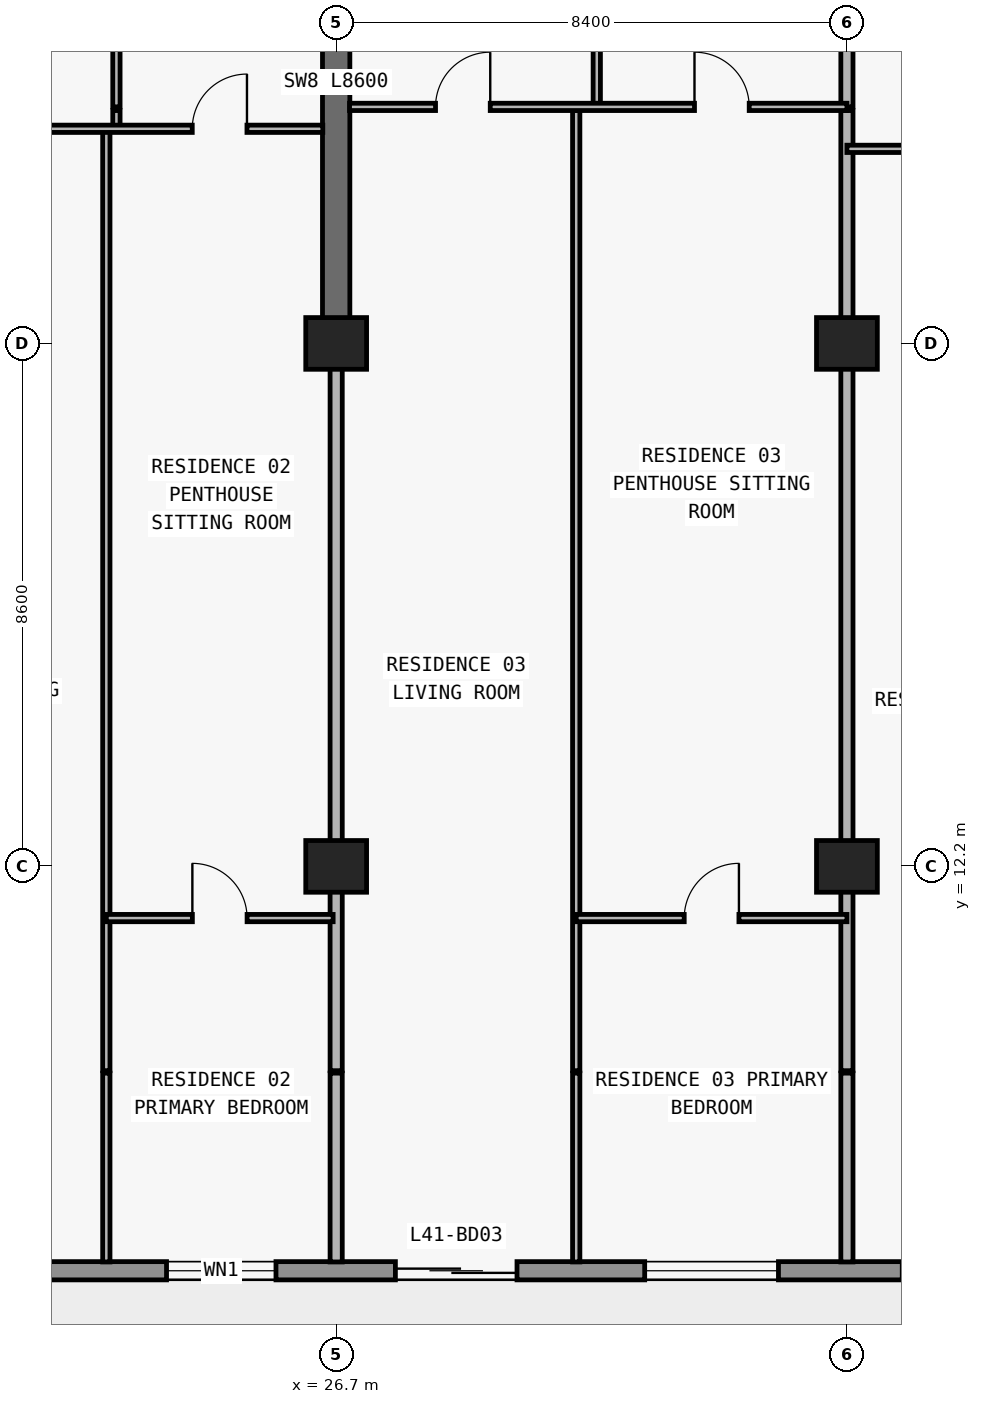
"""IFC4 building model, lengths in metres.
Left out: names, types, materials, properties, quantities, classifications, styles, units other than length and angle.
Written with IfcOpenShell. Run it as: python <this file> out.ifc"""

import sys

from ifc_helpers import new_model, si_unit, direction, frame, frame_2d, origin, origin_2d, place, context, subcontext, project, spatial, rectangle, extrude, element, fill, save


model = new_model("IFC4")
c1 = context("Model", 3, precision=1e-05, world=origin(), true_north=direction((0.0, 1.0)))
c2 = subcontext(c1, "Body", "Model", "MODEL_VIEW")
j1 = project(units=[si_unit("LENGTHUNIT", "METRE"), si_unit("PLANEANGLEUNIT", "RADIAN")], contexts=[c1])
p1 = place(None, origin())
s1 = spatial("IfcSite", under=j1, at=p1, CompositionType="ELEMENT")
p2 = place(p1, origin())
s2 = spatial("IfcBuilding", under=s1, at=p2, CompositionType="ELEMENT")
p3 = place(p2, frame((0.0, 0.0, 148.8)))
s3 = spatial("IfcBuildingStorey", under=s2, at=p3, CompositionType="ELEMENT", Elevation=148.8)
for number, where, z_axis, x_axis in (
    (1, (26.7, 12.2, 0.0), (0.0, 0.0, 1.0), (1.0, 0.0, 0.0)),
    (2, (35.1, 12.2, 0.0), (0.0, 0.0, 1.0), (1.0, 0.0, 0.0)),
    (3, (26.7, 20.8, 0.0), (0.0, 0.0, 1.0), (1.0, 0.0, 0.0)),
    (4, (35.1, 20.8, 0.0), (0.0, 0.0, 1.0), (1.0, 0.0, 0.0)),
):
    element("IfcColumn", number, at=place(p3, frame(where, z_axis=z_axis, x_axis=x_axis)), inside=s3, PredefinedType="COLUMN", context=c2, shape_type="SweptSolid", body=[
        extrude(rectangle(XDim=1.0, YDim=0.85, at=origin_2d()), origin(), (0.0, 0.0, 1.0), 3.0),
    ])
p4 = place(p3, frame((26.7, 20.8, 0.0), z_axis=(0.0, 0.0, 1.0), x_axis=(0.0, 1.0, 0.0)))
e5 = element("IfcWall", 5, at=p4, inside=s3, PredefinedType="SHEAR", context=c2, shape_type="SweptSolid", body=[
    extrude(rectangle(XDim=8.6, YDim=0.45, at=frame_2d((4.3, 0.0))), origin(), (0.0, 0.0, 1.0), 3.0),
])
p5 = place(p3, frame((70.1, 5.55, 0.0), z_axis=(0.0, 0.0, 1.0), x_axis=(-1.0, 0.0, 0.0)))
e6 = element("IfcWall", 6, at=p5, inside=s3, PredefinedType="STANDARD", context=c2, shape_type="SweptSolid", body=[
    extrude(rectangle(XDim=62.4, YDim=0.3, at=frame_2d((31.2, 0.0))), origin(), (0.0, 0.0, 1.0), 3.0),
])
p6 = place(p5, frame((57.226, 0.0, 0.0)))
e7 = element("IfcOpeningElement", 7, at=p6, cuts=e6, PredefinedType="OPENING", context=c2, shape_type="SweptSolid", body=[
    extrude(rectangle(XDim=2.0, YDim=2.3, at=frame_2d((1.0, 1.15))), frame((0.0, 0.16, 0.0), z_axis=(0.0, -1.0, 0.0), x_axis=(1.0, 0.0, 0.0)), (0.0, 0.0, 1.0), 0.32),
])
p7 = place(p5, frame((52.926, 0.0, 0.85)))
e8 = element("IfcOpeningElement", 8, at=p7, cuts=e6, PredefinedType="OPENING", context=c2, shape_type="SweptSolid", body=[
    extrude(rectangle(XDim=2.2, YDim=1.55, at=frame_2d((1.1, 0.775))), frame((0.0, 0.16, 0.0), z_axis=(0.0, -1.0, 0.0), x_axis=(1.0, 0.0, 0.0)), (0.0, 0.0, 1.0), 0.32),
])
p8 = place(p5, frame((48.49, 0.0, 0.0)))
e9 = element("IfcOpeningElement", 9, at=p8, cuts=e6, PredefinedType="OPENING", context=c2, shape_type="SweptSolid", body=[
    extrude(rectangle(XDim=2.0, YDim=2.3, at=frame_2d((1.0, 1.15))), frame((0.0, 0.16, 0.0), z_axis=(0.0, -1.0, 0.0), x_axis=(1.0, 0.0, 0.0)), (0.0, 0.0, 1.0), 0.32),
])
p9 = place(p5, frame((44.39, 0.0, 0.85)))
e10 = element("IfcOpeningElement", 10, at=p9, cuts=e6, PredefinedType="OPENING", context=c2, shape_type="SweptSolid", body=[
    extrude(rectangle(XDim=1.8, YDim=1.55, at=frame_2d((0.9, 0.775))), frame((0.0, 0.16, 0.0), z_axis=(0.0, -1.0, 0.0), x_axis=(1.0, 0.0, 0.0)), (0.0, 0.0, 1.0), 0.32),
])
p10 = place(p5, frame((40.426, 0.0, 0.0)))
e11 = element("IfcOpeningElement", 11, at=p10, cuts=e6, PredefinedType="OPENING", context=c2, shape_type="SweptSolid", body=[
    extrude(rectangle(XDim=2.0, YDim=2.3, at=frame_2d((1.0, 1.15))), frame((0.0, 0.16, 0.0), z_axis=(0.0, -1.0, 0.0), x_axis=(1.0, 0.0, 0.0)), (0.0, 0.0, 1.0), 0.32),
])
p11 = place(p5, frame((36.126, 0.0, 0.85)))
e12 = element("IfcOpeningElement", 12, at=p11, cuts=e6, PredefinedType="OPENING", context=c2, shape_type="SweptSolid", body=[
    extrude(rectangle(XDim=2.2, YDim=1.55, at=frame_2d((1.1, 0.775))), frame((0.0, 0.16, 0.0), z_axis=(0.0, -1.0, 0.0), x_axis=(1.0, 0.0, 0.0)), (0.0, 0.0, 1.0), 0.32),
])
p12 = place(p5, frame((32.09, 0.0, 0.0)))
e13 = element("IfcOpeningElement", 13, at=p12, cuts=e6, PredefinedType="OPENING", context=c2, shape_type="SweptSolid", body=[
    extrude(rectangle(XDim=2.0, YDim=2.3, at=frame_2d((1.0, 1.15))), frame((0.0, 0.16, 0.0), z_axis=(0.0, -1.0, 0.0), x_axis=(1.0, 0.0, 0.0)), (0.0, 0.0, 1.0), 0.32),
])
p13 = place(p5, frame((28.21, 0.0, 0.65)))
e14 = element("IfcOpeningElement", 14, at=p13, cuts=e6, PredefinedType="OPENING", context=c2, shape_type="SweptSolid", body=[
    extrude(rectangle(XDim=2.6, YDim=1.85, at=frame_2d((1.3, 0.925))), frame((0.0, 0.16, 0.0), z_axis=(0.0, -1.0, 0.0), x_axis=(1.0, 0.0, 0.0)), (0.0, 0.0, 1.0), 0.32),
])
p14 = place(p5, frame((22.1, 0.0, 0.85)))
e15 = element("IfcOpeningElement", 15, at=p14, cuts=e6, PredefinedType="OPENING", context=c2, shape_type="SweptSolid", body=[
    extrude(rectangle(XDim=2.2, YDim=1.55, at=frame_2d((1.1, 0.775))), frame((0.0, 0.16, 0.0), z_axis=(0.0, -1.0, 0.0), x_axis=(1.0, 0.0, 0.0)), (0.0, 0.0, 1.0), 0.32),
])
p15 = place(p5, frame((16.09, 0.0, 0.0)))
e16 = element("IfcOpeningElement", 16, at=p15, cuts=e6, PredefinedType="OPENING", context=c2, shape_type="SweptSolid", body=[
    extrude(rectangle(XDim=2.0, YDim=2.3, at=frame_2d((1.0, 1.15))), frame((0.0, 0.16, 0.0), z_axis=(0.0, -1.0, 0.0), x_axis=(1.0, 0.0, 0.0)), (0.0, 0.0, 1.0), 0.32),
])
p16 = place(p5, frame((11.41, 0.0, 0.65)))
e17 = element("IfcOpeningElement", 17, at=p16, cuts=e6, PredefinedType="OPENING", context=c2, shape_type="SweptSolid", body=[
    extrude(rectangle(XDim=2.6, YDim=1.85, at=frame_2d((1.3, 0.925))), frame((0.0, 0.16, 0.0), z_axis=(0.0, -1.0, 0.0), x_axis=(1.0, 0.0, 0.0)), (0.0, 0.0, 1.0), 0.32),
])
p17 = place(p5, frame((5.3, 0.0, 0.85)))
e18 = element("IfcOpeningElement", 18, at=p17, cuts=e6, PredefinedType="OPENING", context=c2, shape_type="SweptSolid", body=[
    extrude(rectangle(XDim=2.2, YDim=1.55, at=frame_2d((1.1, 0.775))), frame((0.0, 0.16, 0.0), z_axis=(0.0, -1.0, 0.0), x_axis=(1.0, 0.0, 0.0)), (0.0, 0.0, 1.0), 0.32),
])
p18 = place(p3, frame((22.92, 5.695, 0.0), z_axis=(0.0, 0.0, 1.0), x_axis=(0.0, 1.0, 0.0)))
e19 = element("IfcWall", 19, at=p18, inside=s3, PredefinedType="PARTITIONING", context=c2, shape_type="SweptSolid", body=[
    extrude(rectangle(XDim=3.105, YDim=0.12, at=frame_2d((1.552, 0.0))), origin(), (0.0, 0.0, 1.0), 3.0),
])
p19 = place(p3, frame((22.92, 8.84, 0.0), z_axis=(0.0, 0.0, 1.0), x_axis=(0.0, 1.0, 0.0)))
e20 = element("IfcWall", 20, at=p19, inside=s3, PredefinedType="PARTITIONING", context=c2, shape_type="SweptSolid", body=[
    extrude(rectangle(XDim=15.49, YDim=0.12, at=frame_2d((7.745, 0.0))), origin(), (0.0, 0.0, 1.0), 3.0),
])
p20 = place(p3, frame((23.086, 24.335, 0.0), z_axis=(0.0, 0.0, 1.0), x_axis=(0.0, 1.0, 0.0)))
e21 = element("IfcWall", 21, at=p20, inside=s3, PredefinedType="PARTITIONING", context=c2, shape_type="SweptSolid", body=[
    extrude(rectangle(XDim=0.295, YDim=0.12, at=frame_2d((0.147, 0.0))), origin(), (0.0, 0.0, 1.0), 3.0),
])
p21 = place(p3, frame((23.086, 24.69, 0.0), z_axis=(0.0, 0.0, 1.0), x_axis=(0.0, 1.0, 0.0)))
e22 = element("IfcWall", 22, at=p21, inside=s3, PredefinedType="PARTITIONING", context=c2, shape_type="SweptSolid", body=[
    extrude(rectangle(XDim=4.79, YDim=0.12, at=frame_2d((2.395, 0.0))), origin(), (0.0, 0.0, 1.0), 3.0),
])
p22 = place(p21, frame((1.945, 0.0, 0.0)))
e23 = element("IfcOpeningElement", 23, at=p22, cuts=e22, PredefinedType="OPENING", context=c2, shape_type="SweptSolid", body=[
    extrude(rectangle(XDim=0.9, YDim=2.15, at=frame_2d((0.45, 1.075))), frame((0.0, 0.07, 0.0), z_axis=(0.0, -1.0, 0.0), x_axis=(1.0, 0.0, 0.0)), (0.0, 0.0, 1.0), 0.14),
])
p23 = place(p3, frame((26.7, 5.695, 0.0), z_axis=(0.0, 0.0, 1.0), x_axis=(0.0, 1.0, 0.0)))
e24 = element("IfcWall", 24, at=p23, inside=s3, PredefinedType="PARTITIONING", context=c2, shape_type="SweptSolid", body=[
    extrude(rectangle(XDim=3.105, YDim=0.2, at=frame_2d((1.552, 0.0))), origin(), (0.0, 0.0, 1.0), 3.0),
])
p24 = place(p3, frame((26.7, 8.84, 0.0), z_axis=(0.0, 0.0, 1.0), x_axis=(0.0, 1.0, 0.0)))
e25 = element("IfcWall", 25, at=p24, inside=s3, PredefinedType="PARTITIONING", context=c2, shape_type="SweptSolid", body=[
    extrude(rectangle(XDim=11.955, YDim=0.2, at=frame_2d((5.978, 0.0))), origin(), (0.0, 0.0, 1.0), 2.124),
])
p25 = place(p3, frame((30.648, 5.695, 0.0), z_axis=(0.0, 0.0, 1.0), x_axis=(0.0, 1.0, 0.0)))
e26 = element("IfcWall", 26, at=p25, inside=s3, PredefinedType="PARTITIONING", context=c2, shape_type="SweptSolid", body=[
    extrude(rectangle(XDim=3.105, YDim=0.12, at=frame_2d((1.552, 0.0))), origin(), (0.0, 0.0, 1.0), 3.0),
])
p26 = place(p3, frame((30.648, 8.84, 0.0), z_axis=(0.0, 0.0, 1.0), x_axis=(0.0, 1.0, 0.0)))
e27 = element("IfcWall", 27, at=p26, inside=s3, PredefinedType="PARTITIONING", context=c2, shape_type="SweptSolid", body=[
    extrude(rectangle(XDim=15.79, YDim=0.12, at=frame_2d((7.895, 0.0))), origin(), (0.0, 0.0, 1.0), 3.0),
])
p27 = place(p3, frame((30.986, 24.69, 0.0), z_axis=(0.0, 0.0, 1.0), x_axis=(0.0, 1.0, 0.0)))
e28 = element("IfcWall", 28, at=p27, inside=s3, PredefinedType="PARTITIONING", context=c2, shape_type="SweptSolid", body=[
    extrude(rectangle(XDim=5.09, YDim=0.12, at=frame_2d((2.545, 0.0))), origin(), (0.0, 0.0, 1.0), 2.436),
])
p28 = place(p27, frame((2.095, 0.0, 0.0)))
e29 = element("IfcOpeningElement", 29, at=p28, cuts=e28, PredefinedType="OPENING", context=c2, shape_type="SweptSolid", body=[
    extrude(rectangle(XDim=0.9, YDim=2.15, at=frame_2d((0.45, 1.075))), frame((0.0, 0.07, 0.0), z_axis=(0.0, -1.0, 0.0), x_axis=(1.0, 0.0, 0.0)), (0.0, 0.0, 1.0), 0.14),
])
p29 = place(p3, frame((35.1, 5.695, 0.0), z_axis=(0.0, 0.0, 1.0), x_axis=(0.0, 1.0, 0.0)))
e30 = element("IfcWall", 30, at=p29, inside=s3, PredefinedType="PARTITIONING", context=c2, shape_type="SweptSolid", body=[
    extrude(rectangle(XDim=3.105, YDim=0.2, at=frame_2d((1.552, 0.0))), origin(), (0.0, 0.0, 1.0), 3.0),
])
p30 = place(p3, frame((35.1, 8.84, 0.0), z_axis=(0.0, 0.0, 1.0), x_axis=(0.0, 1.0, 0.0)))
e31 = element("IfcWall", 31, at=p30, inside=s3, PredefinedType="PARTITIONING", context=c2, shape_type="SweptSolid", body=[
    extrude(rectangle(XDim=15.79, YDim=0.2, at=frame_2d((7.895, 0.0))), origin(), (0.0, 0.0, 1.0), 2.124),
])
p31 = place(p3, frame((35.1, 24.69, 0.0), z_axis=(0.0, 0.0, 1.0), x_axis=(0.0, 1.0, 0.0)))
e32 = element("IfcWall", 32, at=p31, inside=s3, PredefinedType="PARTITIONING", context=c2, shape_type="SweptSolid", body=[
    extrude(rectangle(XDim=5.09, YDim=0.2, at=frame_2d((2.545, 0.0))), origin(), (0.0, 0.0, 1.0), 2.124),
])
p32 = place(p3, frame((22.92, 11.35, 0.0), z_axis=(0.0, 0.0, 1.0), x_axis=(1.0, 0.0, 0.0)))
e33 = element("IfcWall", 33, at=p32, inside=s3, PredefinedType="PARTITIONING", context=c2, shape_type="SweptSolid", body=[
    extrude(rectangle(XDim=3.73, YDim=0.12, at=frame_2d((1.865, 0.0))), origin(), (0.0, 0.0, 1.0), 3.0),
])
p33 = place(p32, frame((1.415, 0.0, 0.0)))
e34 = element("IfcOpeningElement", 34, at=p33, cuts=e33, PredefinedType="OPENING", context=c2, shape_type="SweptSolid", body=[
    extrude(rectangle(XDim=0.9, YDim=2.15, at=frame_2d((0.45, 1.075))), frame((0.0, 0.07, 0.0), z_axis=(0.0, -1.0, 0.0), x_axis=(1.0, 0.0, 0.0)), (0.0, 0.0, 1.0), 0.14),
])
p34 = place(p3, frame((30.648, 11.35, 0.0), z_axis=(0.0, 0.0, 1.0), x_axis=(1.0, 0.0, 0.0)))
e35 = element("IfcWall", 35, at=p34, inside=s3, PredefinedType="PARTITIONING", context=c2, shape_type="SweptSolid", body=[
    extrude(rectangle(XDim=4.452, YDim=0.12, at=frame_2d((2.226, 0.0))), origin(), (0.0, 0.0, 1.0), 3.0),
])
p35 = place(p34, frame((1.776, 0.0, 0.0)))
e36 = element("IfcOpeningElement", 36, at=p35, cuts=e35, PredefinedType="OPENING", context=c2, shape_type="SweptSolid", body=[
    extrude(rectangle(XDim=0.9, YDim=2.15, at=frame_2d((0.45, 1.075))), frame((0.0, 0.07, 0.0), z_axis=(0.0, -1.0, 0.0), x_axis=(1.0, 0.0, 0.0)), (0.0, 0.0, 1.0), 0.14),
])
p36 = place(p3, frame((35.1, 24.0, 0.0), z_axis=(0.0, 0.0, 1.0), x_axis=(1.0, 0.0, 0.0)))
e37 = element("IfcWall", 37, at=p36, inside=s3, PredefinedType="PARTITIONING", context=c2, shape_type="SweptSolid", body=[
    extrude(rectangle(XDim=7.6, YDim=0.12, at=frame_2d((3.8, 0.0))), origin(), (0.0, 0.0, 1.0), 3.0),
])
p37 = place(p36, frame((3.35, 0.0, 0.0)))
e38 = element("IfcOpeningElement", 38, at=p37, cuts=e37, PredefinedType="OPENING", context=c2, shape_type="SweptSolid", body=[
    extrude(rectangle(XDim=0.9, YDim=2.15, at=frame_2d((0.45, 1.075))), frame((0.0, 0.07, 0.0), z_axis=(0.0, -1.0, 0.0), x_axis=(1.0, 0.0, 0.0)), (0.0, 0.0, 1.0), 0.14),
])
p38 = place(p3, frame((18.3, 24.33, 0.0), z_axis=(0.0, 0.0, 1.0), x_axis=(1.0, 0.0, 0.0)))
e39 = element("IfcWall", 39, at=p38, inside=s3, PredefinedType="PARTITIONING", context=c2, shape_type="SweptSolid", body=[
    extrude(rectangle(XDim=8.18, YDim=0.12, at=frame_2d((4.09, 0.0))), origin(), (0.0, 0.0, 1.0), 3.0),
])
p39 = place(p38, frame((1.86, 0.0, 0.0)))
e40 = element("IfcOpeningElement", 40, at=p39, cuts=e39, PredefinedType="OPENING", context=c2, shape_type="SweptSolid", body=[
    extrude(rectangle(XDim=0.9, YDim=2.15, at=frame_2d((0.45, 1.075))), frame((0.0, 0.07, 0.0), z_axis=(0.0, -1.0, 0.0), x_axis=(1.0, 0.0, 0.0)), (0.0, 0.0, 1.0), 0.14),
])
p40 = place(p38, frame((6.033, 0.0, 0.0)))
e41 = element("IfcOpeningElement", 41, at=p40, cuts=e39, PredefinedType="OPENING", context=c2, shape_type="SweptSolid", body=[
    extrude(rectangle(XDim=0.9, YDim=2.15, at=frame_2d((0.45, 1.075))), frame((0.0, 0.07, 0.0), z_axis=(0.0, -1.0, 0.0), x_axis=(1.0, 0.0, 0.0)), (0.0, 0.0, 1.0), 0.14),
])
p41 = place(p3, frame((26.92, 24.69, 0.0), z_axis=(0.0, 0.0, 1.0), x_axis=(1.0, 0.0, 0.0)))
e42 = element("IfcWall", 42, at=p41, inside=s3, PredefinedType="PARTITIONING", context=c2, shape_type="SweptSolid", body=[
    extrude(rectangle(XDim=8.18, YDim=0.12, at=frame_2d((4.09, 0.0))), origin(), (0.0, 0.0, 1.0), 3.0),
])
p42 = place(p41, frame((1.414, 0.0, 0.0)))
e43 = element("IfcOpeningElement", 43, at=p42, cuts=e42, PredefinedType="OPENING", context=c2, shape_type="SweptSolid", body=[
    extrude(rectangle(XDim=0.9, YDim=2.15, at=frame_2d((0.45, 1.075))), frame((0.0, 0.07, 0.0), z_axis=(0.0, -1.0, 0.0), x_axis=(1.0, 0.0, 0.0)), (0.0, 0.0, 1.0), 0.14),
])
p43 = place(p41, frame((5.673, 0.0, 0.0)))
e44 = element("IfcOpeningElement", 44, at=p43, cuts=e42, PredefinedType="OPENING", context=c2, shape_type="SweptSolid", body=[
    extrude(rectangle(XDim=0.9, YDim=2.15, at=frame_2d((0.45, 1.075))), frame((0.0, 0.07, 0.0), z_axis=(0.0, -1.0, 0.0), x_axis=(1.0, 0.0, 0.0)), (0.0, 0.0, 1.0), 0.14),
])
p44 = place(p9, origin())
e45 = element("IfcWindow", 45, at=p44, inside=s3, PartitioningType="SINGLE_PANEL", PredefinedType="WINDOW", context=c2, shape_type="SweptSolid", body=[
    extrude(rectangle(XDim=1.8, YDim=1.55, at=frame_2d((0.9, 0.775))), frame((0.0, 0.03, 0.0), z_axis=(0.0, -1.0, 0.0), x_axis=(1.0, 0.0, 0.0)), (0.0, 0.0, 1.0), 0.06),
])
fill(e10, e45)
p45 = place(p10, origin())
e46 = element("IfcDoor", 46, at=p45, inside=s3, OperationType="DOUBLE_DOOR_SLIDING", PredefinedType="DOOR", context=c2, shape_type="SweptSolid", body=[
    extrude(rectangle(XDim=2.0, YDim=2.3, at=frame_2d((1.0, 1.15))), frame((0.0, 0.025, 0.0), z_axis=(0.0, -1.0, 0.0), x_axis=(1.0, 0.0, 0.0)), (0.0, 0.0, 1.0), 0.05),
])
fill(e11, e46)
p46 = place(p11, origin())
e47 = element("IfcWindow", 47, at=p46, inside=s3, PartitioningType="SINGLE_PANEL", PredefinedType="WINDOW", context=c2, shape_type="SweptSolid", body=[
    extrude(rectangle(XDim=2.2, YDim=1.55, at=frame_2d((1.1, 0.775))), frame((0.0, 0.03, 0.0), z_axis=(0.0, -1.0, 0.0), x_axis=(1.0, 0.0, 0.0)), (0.0, 0.0, 1.0), 0.06),
])
fill(e12, e47)
p47 = place(p40, origin())
e48 = element("IfcDoor", 48, at=p47, inside=s3, OperationType="SINGLE_SWING_RIGHT", PredefinedType="DOOR", context=c2, shape_type="SweptSolid", body=[
    extrude(rectangle(XDim=0.9, YDim=2.15, at=frame_2d((0.45, 1.075))), frame((0.0, 0.025, 0.0), z_axis=(0.0, -1.0, 0.0), x_axis=(1.0, 0.0, 0.0)), (0.0, 0.0, 1.0), 0.05),
])
fill(e41, e48)
p48 = place(p33, origin())
e49 = element("IfcDoor", 49, at=p48, inside=s3, OperationType="SINGLE_SWING_LEFT", PredefinedType="DOOR", context=c2, shape_type="SweptSolid", body=[
    extrude(rectangle(XDim=0.9, YDim=2.15, at=frame_2d((0.45, 1.075))), frame((0.0, 0.025, 0.0), z_axis=(0.0, -1.0, 0.0), x_axis=(1.0, 0.0, 0.0)), (0.0, 0.0, 1.0), 0.05),
])
fill(e34, e49)
p49 = place(p42, origin())
e50 = element("IfcDoor", 50, at=p49, inside=s3, OperationType="SINGLE_SWING_RIGHT", PredefinedType="DOOR", context=c2, shape_type="SweptSolid", body=[
    extrude(rectangle(XDim=0.9, YDim=2.15, at=frame_2d((0.45, 1.075))), frame((0.0, 0.025, 0.0), z_axis=(0.0, -1.0, 0.0), x_axis=(1.0, 0.0, 0.0)), (0.0, 0.0, 1.0), 0.05),
])
fill(e43, e50)
p50 = place(p43, origin())
e51 = element("IfcDoor", 51, at=p50, inside=s3, OperationType="SINGLE_SWING_LEFT", PredefinedType="DOOR", context=c2, shape_type="SweptSolid", body=[
    extrude(rectangle(XDim=0.9, YDim=2.15, at=frame_2d((0.45, 1.075))), frame((0.0, 0.025, 0.0), z_axis=(0.0, -1.0, 0.0), x_axis=(1.0, 0.0, 0.0)), (0.0, 0.0, 1.0), 0.05),
])
fill(e44, e51)
p51 = place(p35, origin())
e52 = element("IfcDoor", 52, at=p51, inside=s3, OperationType="SINGLE_SWING_RIGHT", PredefinedType="DOOR", context=c2, shape_type="SweptSolid", body=[
    extrude(rectangle(XDim=0.9, YDim=2.15, at=frame_2d((0.45, 1.075))), frame((0.0, 0.025, 0.0), z_axis=(0.0, -1.0, 0.0), x_axis=(1.0, 0.0, 0.0)), (0.0, 0.0, 1.0), 0.05),
])
fill(e36, e52)
save(model, sys.argv[1])
